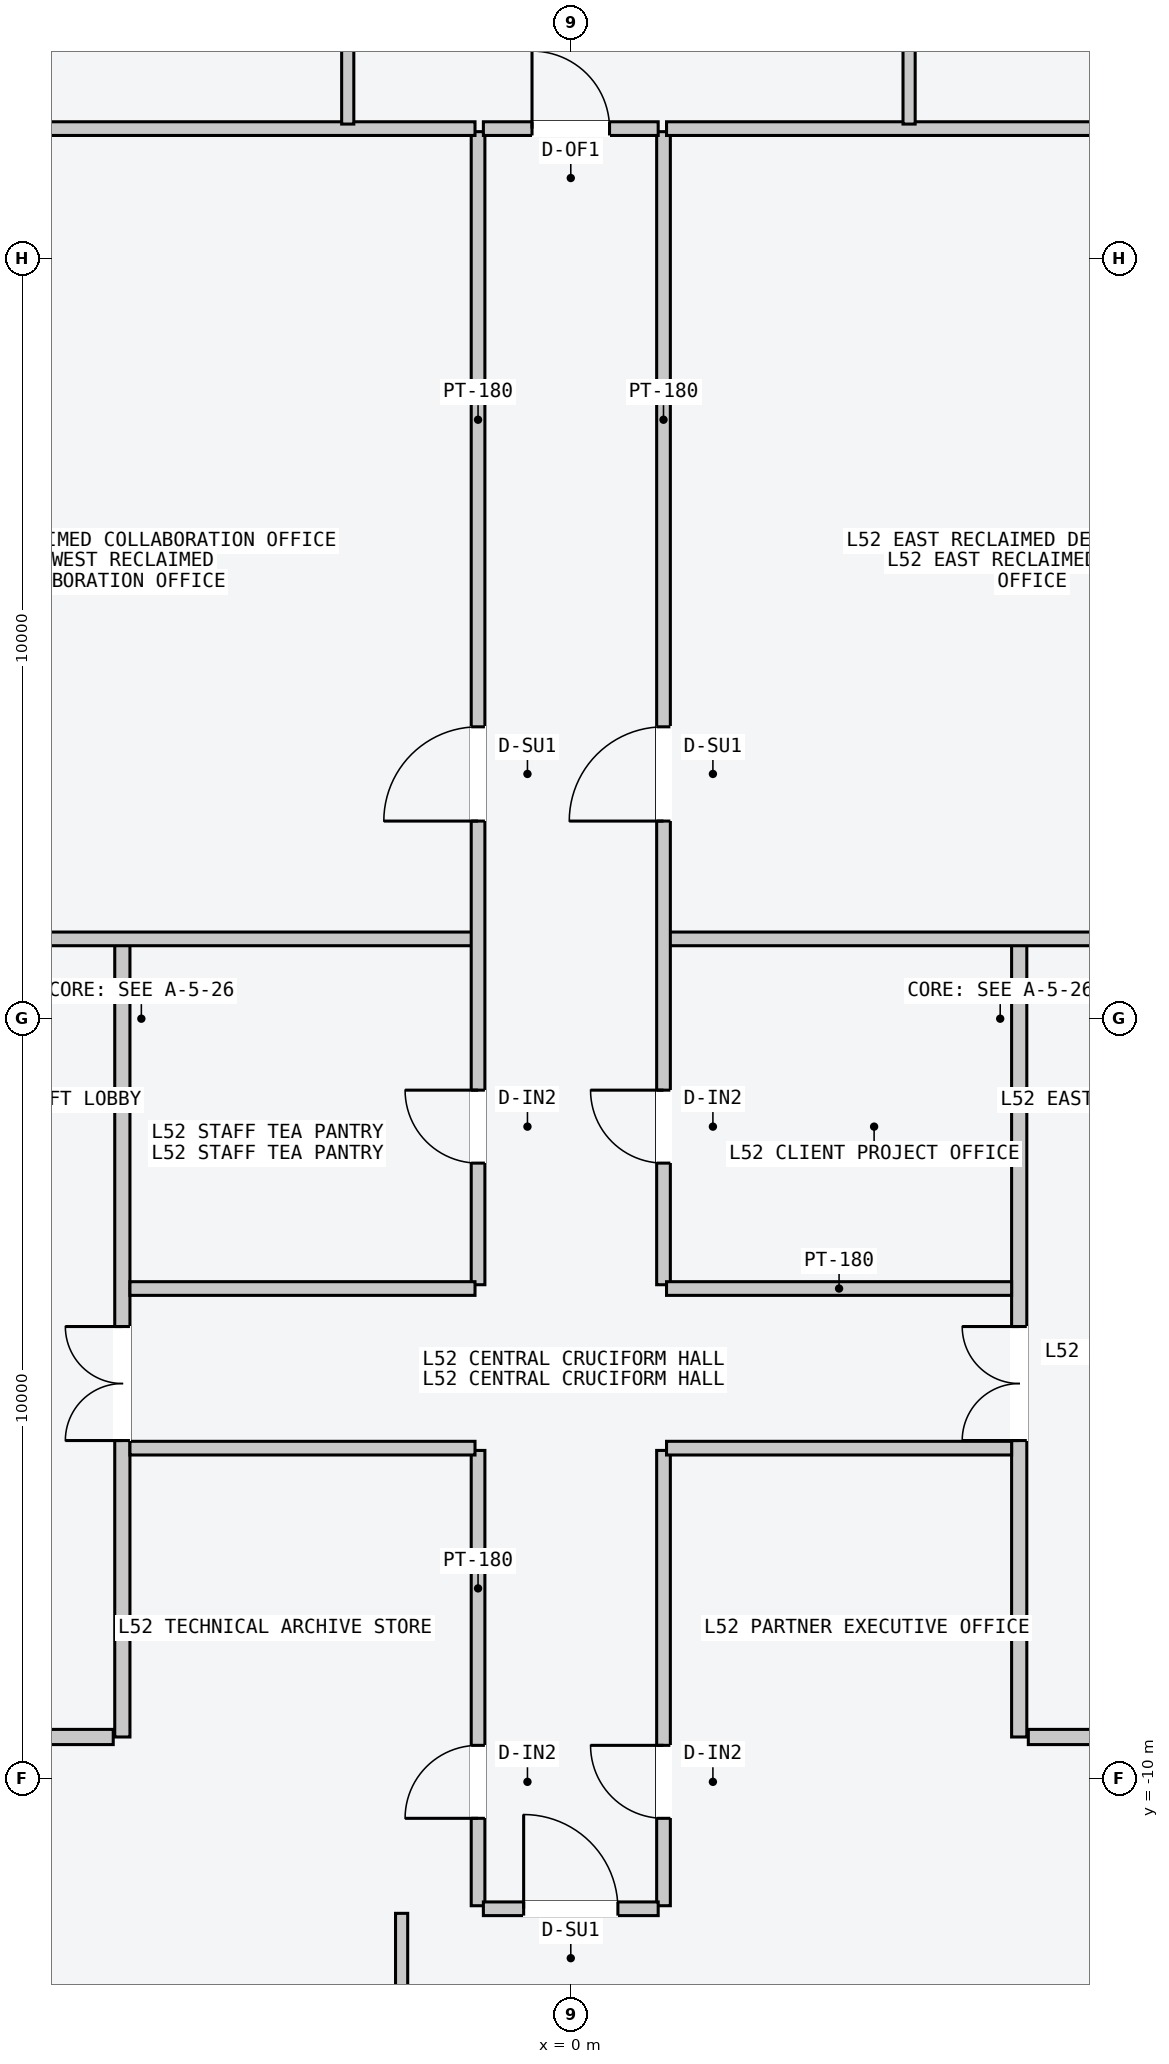
"""IFC4 building model, lengths in metres.
Left out: names, types, materials, properties, quantities, classifications, styles, units other than length and angle.
Written with IfcOpenShell. Run it as: python <this file> out.ifc"""

import sys

from ifc_helpers import new_model, si_unit, direction, frame, frame_2d, origin, place, context, subcontext, project, spatial, rectangle, extrude, element, fill, save


model = new_model("IFC4")
c1 = context("Model", 3, precision=1e-05, world=origin(), true_north=direction((0.0, 1.0)))
c2 = subcontext(c1, "Body", "Model", "MODEL_VIEW")
j1 = project(units=[si_unit("LENGTHUNIT", "METRE"), si_unit("PLANEANGLEUNIT", "RADIAN")], contexts=[c1])
p1 = place(None, origin())
s1 = spatial("IfcSite", under=j1, at=p1, CompositionType="ELEMENT")
p2 = place(p1, origin())
s2 = spatial("IfcBuilding", under=s1, at=p2, CompositionType="ELEMENT")
p3 = place(p2, frame((0.0, 0.0, 198.3)))
s3 = spatial("IfcBuildingStorey", under=s2, at=p3, CompositionType="ELEMENT", Elevation=198.3)
p4 = place(p3, frame((-5.9, -9.45, 0.0), z_axis=(0.0, 0.0, 1.0), x_axis=(0.0, 1.0, 0.0)))
e1 = element("IfcWall", 1, at=p4, inside=s3, PredefinedType="PARTITIONING", context=c2, shape_type="SweptSolid", body=[
    extrude(rectangle(XDim=10.5, YDim=0.2, at=frame_2d((5.25, 0.0))), origin(), (0.0, 0.0, 1.0), 3.4),
])
p5 = place(p4, frame((3.9, 0.0, 0.0)))
e2 = element("IfcOpeningElement", 2, at=p5, cuts=e1, PredefinedType="OPENING", context=c2, shape_type="SweptSolid", body=[
    extrude(rectangle(XDim=1.5, YDim=2.2, at=frame_2d((0.75, 1.1))), frame((0.0, 0.11, 0.0), z_axis=(0.0, -1.0, 0.0), x_axis=(1.0, 0.0, 0.0)), (0.0, 0.0, 1.0), 0.22),
])
p6 = place(p3, frame((-6.02, -9.45, 0.0), z_axis=(0.0, 0.0, 1.0), x_axis=(-1.0, 0.0, 0.0)))
e3 = element("IfcWall", 3, at=p6, inside=s3, PredefinedType="PARTITIONING", context=c2, shape_type="SweptSolid", body=[
    extrude(rectangle(XDim=1.8, YDim=0.2, at=frame_2d((0.9, 0.0))), origin(), (0.0, 0.0, 1.0), 3.4),
])
p7 = place(p3, frame((5.9, -9.45, 0.0), z_axis=(0.0, 0.0, 1.0), x_axis=(0.0, 1.0, 0.0)))
e4 = element("IfcWall", 4, at=p7, inside=s3, PredefinedType="PARTITIONING", context=c2, shape_type="SweptSolid", body=[
    extrude(rectangle(XDim=10.5, YDim=0.2, at=frame_2d((5.25, 0.0))), origin(), (0.0, 0.0, 1.0), 3.4),
])
p8 = place(p7, frame((3.9, 0.0, 0.0)))
e5 = element("IfcOpeningElement", 5, at=p8, cuts=e4, PredefinedType="OPENING", context=c2, shape_type="SweptSolid", body=[
    extrude(rectangle(XDim=1.5, YDim=2.2, at=frame_2d((0.75, 1.1))), frame((0.0, 0.11, 0.0), z_axis=(0.0, -1.0, 0.0), x_axis=(1.0, 0.0, 0.0)), (0.0, 0.0, 1.0), 0.22),
])
p9 = place(p3, frame((6.02, -9.45, 0.0), z_axis=(0.0, 0.0, 1.0), x_axis=(1.0, 0.0, 0.0)))
e6 = element("IfcWall", 6, at=p9, inside=s3, PredefinedType="PARTITIONING", context=c2, shape_type="SweptSolid", body=[
    extrude(rectangle(XDim=1.8, YDim=0.2, at=frame_2d((0.9, 0.0))), origin(), (0.0, 0.0, 1.0), 3.4),
])
p10 = place(p3, frame((-10.05, 1.05, 0.0), z_axis=(0.0, 0.0, 1.0), x_axis=(1.0, 0.0, 0.0)))
e7 = element("IfcWall", 7, at=p10, inside=s3, PredefinedType="PARTITIONING", context=c2, shape_type="SweptSolid", body=[
    extrude(rectangle(XDim=8.79, YDim=0.18, at=frame_2d((4.395, 0.0))), origin(), (0.0, 0.0, 1.0), 3.4),
])
p11 = place(p3, frame((-1.22, -3.5, 0.0), z_axis=(0.0, 0.0, 1.0), x_axis=(0.0, 1.0, 0.0)))
e8 = element("IfcWall", 8, at=p11, inside=s3, PredefinedType="PARTITIONING", context=c2, shape_type="SweptSolid", body=[
    extrude(rectangle(XDim=15.17, YDim=0.18, at=frame_2d((7.585, 0.0))), origin(), (0.0, 0.0, 1.0), 3.4),
])
p12 = place(p11, frame((6.1, 0.0, 0.0)))
e9 = element("IfcOpeningElement", 9, at=p12, cuts=e8, PredefinedType="OPENING", context=c2, shape_type="SweptSolid", body=[
    extrude(rectangle(XDim=1.24, YDim=2.24, at=frame_2d((0.62, 1.12))), frame((0.0, 0.1, 0.0), z_axis=(0.0, -1.0, 0.0), x_axis=(1.0, 0.0, 0.0)), (0.0, 0.0, 1.0), 0.2),
])
p13 = place(p11, frame((1.6, 0.0, 0.0)))
e10 = element("IfcOpeningElement", 10, at=p13, cuts=e8, PredefinedType="OPENING", context=c2, shape_type="SweptSolid", body=[
    extrude(rectangle(XDim=0.96, YDim=2.18, at=frame_2d((0.48, 1.09))), frame((0.0, 0.1, 0.0), z_axis=(0.0, -1.0, 0.0), x_axis=(1.0, 0.0, 0.0)), (0.0, 0.0, 1.0), 0.2),
])
p14 = place(p3, frame((-7.5, 11.71, 0.0), z_axis=(0.0, 0.0, 1.0), x_axis=(1.0, 0.0, 0.0)))
e11 = element("IfcWall", 11, at=p14, inside=s3, PredefinedType="PARTITIONING", context=c2, shape_type="SweptSolid", body=[
    extrude(rectangle(XDim=6.24, YDim=0.18, at=frame_2d((3.12, 0.0))), origin(), (0.0, 0.0, 1.0), 3.4),
])
p15 = place(p3, frame((-5.8, -3.55, 0.0), z_axis=(0.0, 0.0, 1.0), x_axis=(1.0, 0.0, 0.0)))
e12 = element("IfcWall", 12, at=p15, inside=s3, PredefinedType="PARTITIONING", context=c2, shape_type="SweptSolid", body=[
    extrude(rectangle(XDim=4.54, YDim=0.18, at=frame_2d((2.27, 0.0))), origin(), (0.0, 0.0, 1.0), 3.4),
])
p16 = place(p3, frame((1.26, 1.05, 0.0), z_axis=(0.0, 0.0, 1.0), x_axis=(1.0, 0.0, 0.0)))
e13 = element("IfcWall", 13, at=p16, inside=s3, PredefinedType="PARTITIONING", context=c2, shape_type="SweptSolid", body=[
    extrude(rectangle(XDim=8.8, YDim=0.18, at=frame_2d((4.4, 0.0))), origin(), (0.0, 0.0, 1.0), 3.4),
])
p17 = place(p3, frame((1.22, -3.5, 0.0), z_axis=(0.0, 0.0, 1.0), x_axis=(0.0, 1.0, 0.0)))
e14 = element("IfcWall", 14, at=p17, inside=s3, PredefinedType="PARTITIONING", context=c2, shape_type="SweptSolid", body=[
    extrude(rectangle(XDim=15.17, YDim=0.18, at=frame_2d((7.585, 0.0))), origin(), (0.0, 0.0, 1.0), 3.4),
])
p18 = place(p17, frame((6.1, 0.0, 0.0)))
e15 = element("IfcOpeningElement", 15, at=p18, cuts=e14, PredefinedType="OPENING", context=c2, shape_type="SweptSolid", body=[
    extrude(rectangle(XDim=1.24, YDim=2.24, at=frame_2d((0.62, 1.12))), frame((0.0, 0.1, 0.0), z_axis=(0.0, -1.0, 0.0), x_axis=(1.0, 0.0, 0.0)), (0.0, 0.0, 1.0), 0.2),
])
p19 = place(p17, frame((1.6, 0.0, 0.0)))
e16 = element("IfcOpeningElement", 16, at=p19, cuts=e14, PredefinedType="OPENING", context=c2, shape_type="SweptSolid", body=[
    extrude(rectangle(XDim=0.96, YDim=2.18, at=frame_2d((0.48, 1.09))), frame((0.0, 0.1, 0.0), z_axis=(0.0, -1.0, 0.0), x_axis=(1.0, 0.0, 0.0)), (0.0, 0.0, 1.0), 0.2),
])
p20 = place(p3, frame((1.26, 11.71, 0.0), z_axis=(0.0, 0.0, 1.0), x_axis=(1.0, 0.0, 0.0)))
e17 = element("IfcWall", 17, at=p20, inside=s3, PredefinedType="PARTITIONING", context=c2, shape_type="SweptSolid", body=[
    extrude(rectangle(XDim=6.24, YDim=0.18, at=frame_2d((3.12, 0.0))), origin(), (0.0, 0.0, 1.0), 3.4),
])
p21 = place(p3, frame((1.26, -3.55, 0.0), z_axis=(0.0, 0.0, 1.0), x_axis=(1.0, 0.0, 0.0)))
e18 = element("IfcWall", 18, at=p21, inside=s3, PredefinedType="PARTITIONING", context=c2, shape_type="SweptSolid", body=[
    extrude(rectangle(XDim=4.54, YDim=0.18, at=frame_2d((2.27, 0.0))), origin(), (0.0, 0.0, 1.0), 3.4),
])
p22 = place(p3, frame((-1.22, -11.67, 0.0), z_axis=(0.0, 0.0, 1.0), x_axis=(0.0, 1.0, 0.0)))
e19 = element("IfcWall", 19, at=p22, inside=s3, PredefinedType="PARTITIONING", context=c2, shape_type="SweptSolid", body=[
    extrude(rectangle(XDim=5.99, YDim=0.18, at=frame_2d((2.995, 0.0))), origin(), (0.0, 0.0, 1.0), 3.4),
])
p23 = place(p22, frame((1.15, 0.0, 0.0)))
e20 = element("IfcOpeningElement", 20, at=p23, cuts=e19, PredefinedType="OPENING", context=c2, shape_type="SweptSolid", body=[
    extrude(rectangle(XDim=0.96, YDim=2.18, at=frame_2d((0.48, 1.09))), frame((0.0, 0.1, 0.0), z_axis=(0.0, -1.0, 0.0), x_axis=(1.0, 0.0, 0.0)), (0.0, 0.0, 1.0), 0.2),
])
p24 = place(p3, frame((1.22, -11.67, 0.0), z_axis=(0.0, 0.0, 1.0), x_axis=(0.0, 1.0, 0.0)))
e21 = element("IfcWall", 21, at=p24, inside=s3, PredefinedType="PARTITIONING", context=c2, shape_type="SweptSolid", body=[
    extrude(rectangle(XDim=5.99, YDim=0.18, at=frame_2d((2.995, 0.0))), origin(), (0.0, 0.0, 1.0), 3.4),
])
p25 = place(p24, frame((1.15, 0.0, 0.0)))
e22 = element("IfcOpeningElement", 22, at=p25, cuts=e21, PredefinedType="OPENING", context=c2, shape_type="SweptSolid", body=[
    extrude(rectangle(XDim=0.96, YDim=2.18, at=frame_2d((0.48, 1.09))), frame((0.0, 0.1, 0.0), z_axis=(0.0, -1.0, 0.0), x_axis=(1.0, 0.0, 0.0)), (0.0, 0.0, 1.0), 0.2),
])
for number, where, z_axis, x_axis in (
    (23, (-5.8, -5.65, 0.0), (0.0, 0.0, 1.0), (1.0, 0.0, 0.0)),
    (24, (1.26, -5.65, 0.0), (0.0, 0.0, 1.0), (1.0, 0.0, 0.0)),
):
    element("IfcWall", number, at=place(p3, frame(where, z_axis=z_axis, x_axis=x_axis)), inside=s3, PredefinedType="PARTITIONING", context=c2, shape_type="SweptSolid", body=[
        extrude(rectangle(XDim=4.54, YDim=0.18, at=frame_2d((2.27, 0.0))), origin(), (0.0, 0.0, 1.0), 3.4),
    ])
p26 = place(p3, frame((-2.935, 11.77, 0.0), z_axis=(0.0, 0.0, 1.0), x_axis=(0.0, 1.0, 0.0)))
e25 = element("IfcWall", 25, at=p26, inside=s3, PredefinedType="PARTITIONING", context=c2, shape_type="SweptSolid", body=[
    extrude(rectangle(XDim=6.79, YDim=0.16, at=frame_2d((3.395, 0.0))), origin(), (0.0, 0.0, 1.0), 3.4),
])
p27 = place(p26, frame((1.15, 0.0, 0.0)))
e26 = element("IfcOpeningElement", 26, at=p27, cuts=e25, PredefinedType="OPENING", context=c2, shape_type="SweptSolid", body=[
    extrude(rectangle(XDim=0.96, YDim=2.18, at=frame_2d((0.48, 1.09))), frame((0.0, 0.09, 0.0), z_axis=(0.0, -1.0, 0.0), x_axis=(1.0, 0.0, 0.0)), (0.0, 0.0, 1.0), 0.18),
])
p28 = place(p3, frame((4.451, 11.77, 0.0), z_axis=(0.0, 0.0, 1.0), x_axis=(0.0, 1.0, 0.0)))
e27 = element("IfcWall", 27, at=p28, inside=s3, PredefinedType="PARTITIONING", context=c2, shape_type="SweptSolid", body=[
    extrude(rectangle(XDim=6.79, YDim=0.16, at=frame_2d((3.395, 0.0))), origin(), (0.0, 0.0, 1.0), 3.4),
])
p29 = place(p28, frame((1.15, 0.0, 0.0)))
e28 = element("IfcOpeningElement", 28, at=p29, cuts=e27, PredefinedType="OPENING", context=c2, shape_type="SweptSolid", body=[
    extrude(rectangle(XDim=0.96, YDim=2.18, at=frame_2d((0.48, 1.09))), frame((0.0, 0.09, 0.0), z_axis=(0.0, -1.0, 0.0), x_axis=(1.0, 0.0, 0.0)), (0.0, 0.0, 1.0), 0.18),
])
p30 = place(p3, frame((-1.15, 11.71, 0.0), z_axis=(0.0, 0.0, 1.0), x_axis=(1.0, 0.0, 0.0)))
e29 = element("IfcWall", 29, at=p30, inside=s3, PredefinedType="PARTITIONING", context=c2, shape_type="SweptSolid", body=[
    extrude(rectangle(XDim=2.3, YDim=0.18, at=frame_2d((1.15, 0.0))), origin(), (0.0, 0.0, 1.0), 3.4),
])
p31 = place(p30, frame((0.64, 0.0, 0.0)))
e30 = element("IfcOpeningElement", 30, at=p31, cuts=e29, PredefinedType="OPENING", context=c2, shape_type="SweptSolid", body=[
    extrude(rectangle(XDim=1.02, YDim=2.2, at=frame_2d((0.51, 1.1))), frame((0.0, 0.1, 0.0), z_axis=(0.0, -1.0, 0.0), x_axis=(1.0, 0.0, 0.0)), (0.0, 0.0, 1.0), 0.2),
])
p32 = place(p3, frame((-2.226, -18.56, 0.0), z_axis=(0.0, 0.0, 1.0), x_axis=(0.0, 1.0, 0.0)))
e31 = element("IfcWall", 31, at=p32, inside=s3, PredefinedType="PARTITIONING", context=c2, shape_type="SweptSolid", body=[
    extrude(rectangle(XDim=6.79, YDim=0.16, at=frame_2d((3.395, 0.0))), origin(), (0.0, 0.0, 1.0), 3.4),
])
p33 = place(p32, frame((1.05, 0.0, 0.0)))
e32 = element("IfcOpeningElement", 32, at=p33, cuts=e31, PredefinedType="OPENING", context=c2, shape_type="SweptSolid", body=[
    extrude(rectangle(XDim=0.96, YDim=2.18, at=frame_2d((0.48, 1.09))), frame((0.0, 0.09, 0.0), z_axis=(0.0, -1.0, 0.0), x_axis=(1.0, 0.0, 0.0)), (0.0, 0.0, 1.0), 0.18),
])
p34 = place(p3, frame((-1.15, -11.71, 0.0), z_axis=(0.0, 0.0, 1.0), x_axis=(1.0, 0.0, 0.0)))
e33 = element("IfcWall", 33, at=p34, inside=s3, PredefinedType="PARTITIONING", context=c2, shape_type="SweptSolid", body=[
    extrude(rectangle(XDim=2.3, YDim=0.18, at=frame_2d((1.15, 0.0))), origin(), (0.0, 0.0, 1.0), 3.4),
])
p35 = place(p34, frame((0.53, 0.0, 0.0)))
e34 = element("IfcOpeningElement", 34, at=p35, cuts=e33, PredefinedType="OPENING", context=c2, shape_type="SweptSolid", body=[
    extrude(rectangle(XDim=1.24, YDim=2.24, at=frame_2d((0.62, 1.12))), frame((0.0, 0.1, 0.0), z_axis=(0.0, -1.0, 0.0), x_axis=(1.0, 0.0, 0.0)), (0.0, 0.0, 1.0), 0.2),
])
p36 = place(p5, origin())
e35 = element("IfcDoor", 35, at=p36, inside=s3, OperationType="DOUBLE_DOOR_SINGLE_SWING", PredefinedType="DOOR", context=c2, shape_type="SweptSolid", body=[
    extrude(rectangle(XDim=1.5, YDim=2.2, at=frame_2d((0.75, 1.1))), frame((0.0, 0.025, 0.0), z_axis=(0.0, -1.0, 0.0), x_axis=(1.0, 0.0, 0.0)), (0.0, 0.0, 1.0), 0.05),
])
fill(e2, e35)
p37 = place(p8, origin())
e36 = element("IfcDoor", 36, at=p37, inside=s3, OperationType="DOUBLE_DOOR_SINGLE_SWING", PredefinedType="DOOR", context=c2, shape_type="SweptSolid", body=[
    extrude(rectangle(XDim=1.5, YDim=2.2, at=frame_2d((0.75, 1.1))), frame((0.0, 0.025, 0.0), z_axis=(0.0, -1.0, 0.0), x_axis=(1.0, 0.0, 0.0)), (0.0, 0.0, 1.0), 0.05),
])
fill(e5, e36)
p38 = place(p12, origin())
e37 = element("IfcDoor", 37, at=p38, inside=s3, OperationType="SINGLE_SWING_LEFT", PredefinedType="DOOR", context=c2, shape_type="SweptSolid", body=[
    extrude(rectangle(XDim=1.24, YDim=2.24, at=frame_2d((0.62, 1.12))), frame((0.0, 0.025, 0.0), z_axis=(0.0, -1.0, 0.0), x_axis=(1.0, 0.0, 0.0)), (0.0, 0.0, 1.0), 0.05),
])
fill(e9, e37)
p39 = place(p13, origin())
e38 = element("IfcDoor", 38, at=p39, inside=s3, OperationType="SINGLE_SWING_RIGHT", PredefinedType="DOOR", context=c2, shape_type="SweptSolid", body=[
    extrude(rectangle(XDim=0.96, YDim=2.18, at=frame_2d((0.48, 1.09))), frame((0.0, 0.025, 0.0), z_axis=(0.0, -1.0, 0.0), x_axis=(1.0, 0.0, 0.0)), (0.0, 0.0, 1.0), 0.05),
])
fill(e10, e38)
p40 = place(p18, origin())
e39 = element("IfcDoor", 39, at=p40, inside=s3, OperationType="SINGLE_SWING_LEFT", PredefinedType="DOOR", context=c2, shape_type="SweptSolid", body=[
    extrude(rectangle(XDim=1.24, YDim=2.24, at=frame_2d((0.62, 1.12))), frame((0.0, 0.025, 0.0), z_axis=(0.0, -1.0, 0.0), x_axis=(1.0, 0.0, 0.0)), (0.0, 0.0, 1.0), 0.05),
])
fill(e15, e39)
p41 = place(p19, origin())
e40 = element("IfcDoor", 40, at=p41, inside=s3, OperationType="SINGLE_SWING_RIGHT", PredefinedType="DOOR", context=c2, shape_type="SweptSolid", body=[
    extrude(rectangle(XDim=0.96, YDim=2.18, at=frame_2d((0.48, 1.09))), frame((0.0, 0.025, 0.0), z_axis=(0.0, -1.0, 0.0), x_axis=(1.0, 0.0, 0.0)), (0.0, 0.0, 1.0), 0.05),
])
fill(e16, e40)
p42 = place(p23, origin())
e41 = element("IfcDoor", 41, at=p42, inside=s3, OperationType="SINGLE_SWING_LEFT", PredefinedType="DOOR", context=c2, shape_type="SweptSolid", body=[
    extrude(rectangle(XDim=0.96, YDim=2.18, at=frame_2d((0.48, 1.09))), frame((0.0, 0.025, 0.0), z_axis=(0.0, -1.0, 0.0), x_axis=(1.0, 0.0, 0.0)), (0.0, 0.0, 1.0), 0.05),
])
fill(e20, e41)
p43 = place(p25, origin())
e42 = element("IfcDoor", 42, at=p43, inside=s3, OperationType="SINGLE_SWING_RIGHT", PredefinedType="DOOR", context=c2, shape_type="SweptSolid", body=[
    extrude(rectangle(XDim=0.96, YDim=2.18, at=frame_2d((0.48, 1.09))), frame((0.0, 0.025, 0.0), z_axis=(0.0, -1.0, 0.0), x_axis=(1.0, 0.0, 0.0)), (0.0, 0.0, 1.0), 0.05),
])
fill(e22, e42)
p44 = place(p31, origin())
e43 = element("IfcDoor", 43, at=p44, inside=s3, OperationType="SINGLE_SWING_LEFT", PredefinedType="DOOR", context=c2, shape_type="SweptSolid", body=[
    extrude(rectangle(XDim=1.02, YDim=2.2, at=frame_2d((0.51, 1.1))), frame((0.0, 0.025, 0.0), z_axis=(0.0, -1.0, 0.0), x_axis=(1.0, 0.0, 0.0)), (0.0, 0.0, 1.0), 0.05),
])
fill(e30, e43)
p45 = place(p35, origin())
e44 = element("IfcDoor", 44, at=p45, inside=s3, OperationType="SINGLE_SWING_LEFT", PredefinedType="DOOR", context=c2, shape_type="SweptSolid", body=[
    extrude(rectangle(XDim=1.24, YDim=2.24, at=frame_2d((0.62, 1.12))), frame((0.0, 0.025, 0.0), z_axis=(0.0, -1.0, 0.0), x_axis=(1.0, 0.0, 0.0)), (0.0, 0.0, 1.0), 0.05),
])
fill(e34, e44)
save(model, sys.argv[1])
